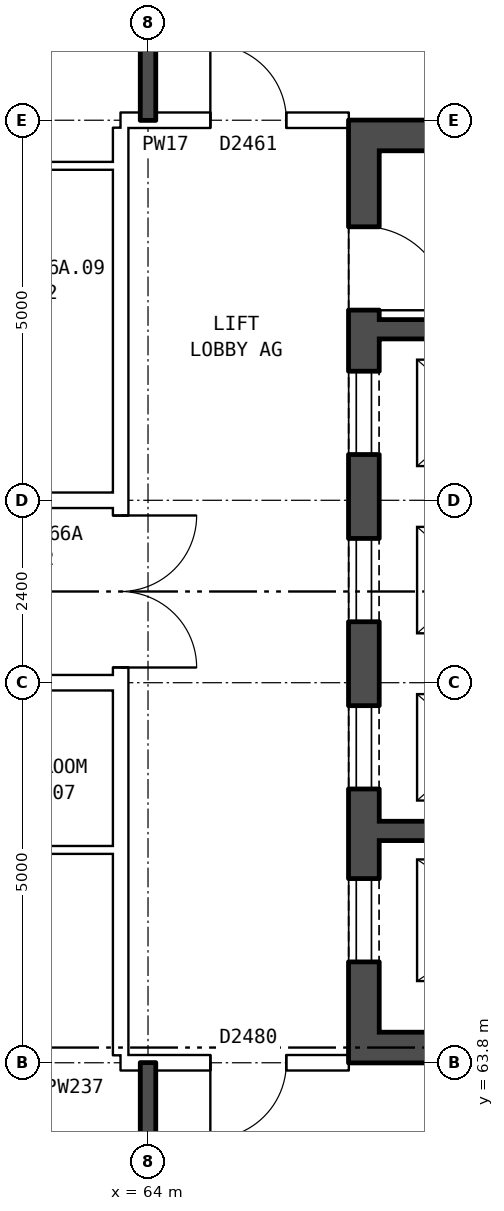
"""IFC4 building model, lengths in metres.
Left out: names, types, materials, properties, quantities, classifications, styles, units other than length and angle.
Written with IfcOpenShell. Run it as: python <this file> out.ifc"""

import sys

from ifc_helpers import new_model, si_unit, direction, frame, frame_2d, origin, place, context, subcontext, project, spatial, rectangle, extrude, element, fill, save


model = new_model("IFC4")
c1 = context("Model", 3, precision=1e-05, world=origin(), true_north=direction((0.0, 1.0)))
c2 = subcontext(c1, "Body", "Model", "MODEL_VIEW")
j1 = project(units=[si_unit("LENGTHUNIT", "METRE"), si_unit("PLANEANGLEUNIT", "RADIAN")], contexts=[c1])
p1 = place(None, origin())
s1 = spatial("IfcSite", under=j1, at=p1, CompositionType="ELEMENT")
p2 = place(p1, origin())
s2 = spatial("IfcBuilding", under=s1, at=p2, CompositionType="ELEMENT")
p3 = place(p2, frame((0.0, 0.0, 233.8)))
s3 = spatial("IfcBuildingStorey", under=s2, at=p3, CompositionType="ELEMENT", Elevation=233.8)
p4 = place(p3, frame((66.84, 63.8, 0.0), z_axis=(0.0, 0.0, 1.0), x_axis=(0.0, 1.0, 0.0)))
e1 = element("IfcWall", 1, at=p4, inside=s3, PredefinedType="SHEAR", context=c2, shape_type="SweptSolid", body=[
    extrude(rectangle(XDim=12.4, YDim=0.4, at=frame_2d((6.2, 0.0))), origin(), (0.0, 0.0, 1.0), 2.85),
])
p5 = place(p4, frame((1.325, 0.0, 0.0)))
e2 = element("IfcOpeningElement", 2, at=p5, cuts=e1, PredefinedType="OPENING", context=c2, shape_type="SweptSolid", body=[
    extrude(rectangle(XDim=1.1, YDim=2.1, at=frame_2d((0.55, 1.05))), frame((0.0, 0.21, 0.0), z_axis=(0.0, -1.0, 0.0), x_axis=(1.0, 0.0, 0.0)), (0.0, 0.0, 1.0), 0.42),
])
p6 = place(p4, frame((3.6, 0.0, 0.0)))
e3 = element("IfcOpeningElement", 3, at=p6, cuts=e1, PredefinedType="OPENING", context=c2, shape_type="SweptSolid", body=[
    extrude(rectangle(XDim=1.1, YDim=2.1, at=frame_2d((0.55, 1.05))), frame((0.0, 0.21, 0.0), z_axis=(0.0, -1.0, 0.0), x_axis=(1.0, 0.0, 0.0)), (0.0, 0.0, 1.0), 0.42),
])
p7 = place(p4, frame((5.8, 0.0, 0.0)))
e4 = element("IfcOpeningElement", 4, at=p7, cuts=e1, PredefinedType="OPENING", context=c2, shape_type="SweptSolid", body=[
    extrude(rectangle(XDim=1.1, YDim=2.1, at=frame_2d((0.55, 1.05))), frame((0.0, 0.21, 0.0), z_axis=(0.0, -1.0, 0.0), x_axis=(1.0, 0.0, 0.0)), (0.0, 0.0, 1.0), 0.42),
])
p8 = place(p4, frame((8.0, 0.0, 0.0)))
e5 = element("IfcOpeningElement", 5, at=p8, cuts=e1, PredefinedType="OPENING", context=c2, shape_type="SweptSolid", body=[
    extrude(rectangle(XDim=1.1, YDim=2.1, at=frame_2d((0.55, 1.05))), frame((0.0, 0.21, 0.0), z_axis=(0.0, -1.0, 0.0), x_axis=(1.0, 0.0, 0.0)), (0.0, 0.0, 1.0), 0.42),
])
p9 = place(p4, frame((9.9, 0.0, 0.0)))
e6 = element("IfcOpeningElement", 6, at=p9, cuts=e1, PredefinedType="OPENING", context=c2, shape_type="SweptSolid", body=[
    extrude(rectangle(XDim=1.1, YDim=2.1, at=frame_2d((0.55, 1.05))), frame((0.0, 0.21, 0.0), z_axis=(0.0, -1.0, 0.0), x_axis=(1.0, 0.0, 0.0)), (0.0, 0.0, 1.0), 0.42),
])
for number, where, z_axis, x_axis in (
    (7, (67.04, 64.0, 0.0), (0.0, 0.0, 1.0), (1.0, 0.0, 0.0)),
    (8, (67.04, 76.0, 0.0), (0.0, 0.0, 1.0), (1.0, 0.0, 0.0)),
):
    element("IfcWall", number, at=place(p3, frame(where, z_axis=z_axis, x_axis=x_axis)), inside=s3, PredefinedType="SHEAR", context=c2, shape_type="SweptSolid", body=[
        extrude(rectangle(XDim=8.2, YDim=0.4, at=frame_2d((4.1, 0.0))), origin(), (0.0, 0.0, 1.0), 2.85),
    ])
p10 = place(p3, frame((67.04, 66.85, 0.0), z_axis=(0.0, 0.0, 1.0), x_axis=(1.0, 0.0, 0.0)))
e9 = element("IfcWall", 9, at=p10, inside=s3, PredefinedType="SHEAR", context=c2, shape_type="SweptSolid", body=[
    extrude(rectangle(XDim=3.595, YDim=0.25, at=frame_2d((1.797, 0.0))), origin(), (0.0, 0.0, 1.0), 2.85),
])
p11 = place(p3, frame((67.04, 73.45, 0.0), z_axis=(0.0, 0.0, 1.0), x_axis=(1.0, 0.0, 0.0)))
e10 = element("IfcWall", 10, at=p11, inside=s3, PredefinedType="SHEAR", context=c2, shape_type="SweptSolid", body=[
    extrude(rectangle(XDim=2.525, YDim=0.25, at=frame_2d((1.262, 0.0))), origin(), (0.0, 0.0, 1.0), 2.85),
])
p12 = place(p3, frame((63.64, 63.9, 0.0), z_axis=(0.0, 0.0, 1.0), x_axis=(0.0, 1.0, 0.0)))
e11 = element("IfcWall", 11, at=p12, inside=s3, PredefinedType="PARTITIONING", context=c2, shape_type="SweptSolid", body=[
    extrude(rectangle(XDim=12.2, YDim=0.2, at=frame_2d((6.1, 0.0))), origin(), (0.0, 0.0, 1.0), 2.85),
])
p13 = place(p12, frame((5.1, 0.0, 0.0)))
e12 = element("IfcOpeningElement", 12, at=p13, cuts=e11, PredefinedType="OPENING", context=c2, shape_type="SweptSolid", body=[
    extrude(rectangle(XDim=2.0, YDim=2.1, at=frame_2d((1.0, 1.05))), frame((0.0, 0.11, 0.0), z_axis=(0.0, -1.0, 0.0), x_axis=(1.0, 0.0, 0.0)), (0.0, 0.0, 1.0), 0.22),
])
p14 = place(p3, frame((63.64, 63.8, 0.0), z_axis=(0.0, 0.0, 1.0), x_axis=(1.0, 0.0, 0.0)))
e13 = element("IfcWall", 13, at=p14, inside=s3, PredefinedType="PARTITIONING", context=c2, shape_type="SweptSolid", body=[
    extrude(rectangle(XDim=3.0, YDim=0.2, at=frame_2d((1.5, 0.0))), origin(), (0.0, 0.0, 1.0), 2.85),
])
p15 = place(p14, frame((1.18, 0.0, 0.0)))
e14 = element("IfcOpeningElement", 14, at=p15, cuts=e13, PredefinedType="OPENING", context=c2, shape_type="SweptSolid", body=[
    extrude(rectangle(XDim=1.0, YDim=2.1, at=frame_2d((0.5, 1.05))), frame((0.0, 0.11, 0.0), z_axis=(0.0, -1.0, 0.0), x_axis=(1.0, 0.0, 0.0)), (0.0, 0.0, 1.0), 0.22),
])
p16 = place(p3, frame((61.0, 66.6, 0.0), z_axis=(0.0, 0.0, 1.0), x_axis=(1.0, 0.0, 0.0)))
e15 = element("IfcWall", 15, at=p16, inside=s3, PredefinedType="PARTITIONING", context=c2, shape_type="SweptSolid", body=[
    extrude(rectangle(XDim=2.64, YDim=0.1, at=frame_2d((1.32, 0.0))), origin(), (0.0, 0.0, 1.0), 2.85),
])
p17 = place(p3, frame((44.36, 68.8, 0.0), z_axis=(0.0, 0.0, 1.0), x_axis=(1.0, 0.0, 0.0)))
e16 = element("IfcWall", 16, at=p17, inside=s3, PredefinedType="PARTITIONING", context=c2, shape_type="SweptSolid", body=[
    extrude(rectangle(XDim=19.28, YDim=0.2, at=frame_2d((9.64, 0.0))), origin(), (0.0, 0.0, 1.0), 2.85),
])
p18 = place(p17, frame((14.64, 0.0, 0.0)))
e17 = element("IfcOpeningElement", 17, at=p18, cuts=e16, PredefinedType="OPENING", context=c2, shape_type="SweptSolid", body=[
    extrude(rectangle(XDim=1.0, YDim=2.1, at=frame_2d((0.5, 1.05))), frame((0.0, 0.11, 0.0), z_axis=(0.0, -1.0, 0.0), x_axis=(1.0, 0.0, 0.0)), (0.0, 0.0, 1.0), 0.22),
])
p19 = place(p17, frame((5.64, 0.0, 0.0)))
e18 = element("IfcOpeningElement", 18, at=p19, cuts=e16, PredefinedType="OPENING", context=c2, shape_type="SweptSolid", body=[
    extrude(rectangle(XDim=1.0, YDim=2.1, at=frame_2d((0.5, 1.05))), frame((0.0, 0.11, 0.0), z_axis=(0.0, -1.0, 0.0), x_axis=(1.0, 0.0, 0.0)), (0.0, 0.0, 1.0), 0.22),
])
p20 = place(p3, frame((44.36, 71.2, 0.0), z_axis=(0.0, 0.0, 1.0), x_axis=(1.0, 0.0, 0.0)))
e19 = element("IfcWall", 19, at=p20, inside=s3, PredefinedType="PARTITIONING", context=c2, shape_type="SweptSolid", body=[
    extrude(rectangle(XDim=19.28, YDim=0.2, at=frame_2d((9.64, 0.0))), origin(), (0.0, 0.0, 1.0), 2.85),
])
p21 = place(p20, frame((14.64, 0.0, 0.0)))
e20 = element("IfcOpeningElement", 20, at=p21, cuts=e19, PredefinedType="OPENING", context=c2, shape_type="SweptSolid", body=[
    extrude(rectangle(XDim=1.0, YDim=2.1, at=frame_2d((0.5, 1.05))), frame((0.0, 0.11, 0.0), z_axis=(0.0, -1.0, 0.0), x_axis=(1.0, 0.0, 0.0)), (0.0, 0.0, 1.0), 0.22),
])
p22 = place(p20, frame((11.64, 0.0, 0.0)))
e21 = element("IfcOpeningElement", 21, at=p22, cuts=e19, PredefinedType="OPENING", context=c2, shape_type="SweptSolid", body=[
    extrude(rectangle(XDim=1.0, YDim=2.1, at=frame_2d((0.5, 1.05))), frame((0.0, 0.11, 0.0), z_axis=(0.0, -1.0, 0.0), x_axis=(1.0, 0.0, 0.0)), (0.0, 0.0, 1.0), 0.22),
])
p23 = place(p20, frame((2.64, 0.0, 0.0)))
e22 = element("IfcOpeningElement", 22, at=p23, cuts=e19, PredefinedType="OPENING", context=c2, shape_type="SweptSolid", body=[
    extrude(rectangle(XDim=1.0, YDim=2.1, at=frame_2d((0.5, 1.05))), frame((0.0, 0.11, 0.0), z_axis=(0.0, -1.0, 0.0), x_axis=(1.0, 0.0, 0.0)), (0.0, 0.0, 1.0), 0.22),
])
p24 = place(p3, frame((61.0, 75.6, 0.0), z_axis=(0.0, 0.0, 1.0), x_axis=(1.0, 0.0, 0.0)))
e23 = element("IfcWall", 23, at=p24, inside=s3, PredefinedType="PARTITIONING", context=c2, shape_type="SweptSolid", body=[
    extrude(rectangle(XDim=2.64, YDim=0.1, at=frame_2d((1.32, 0.0))), origin(), (0.0, 0.0, 1.0), 2.85),
])
p25 = place(p3, frame((63.64, 76.2, 0.0), z_axis=(0.0, 0.0, 1.0), x_axis=(1.0, 0.0, 0.0)))
e24 = element("IfcWall", 24, at=p25, inside=s3, PredefinedType="PARTITIONING", context=c2, shape_type="SweptSolid", body=[
    extrude(rectangle(XDim=3.0, YDim=0.2, at=frame_2d((1.5, 0.0))), origin(), (0.0, 0.0, 1.0), 2.85),
])
p26 = place(p25, frame((1.18, 0.0, 0.0)))
e25 = element("IfcOpeningElement", 25, at=p26, cuts=e24, PredefinedType="OPENING", context=c2, shape_type="SweptSolid", body=[
    extrude(rectangle(XDim=1.0, YDim=2.1, at=frame_2d((0.5, 1.05))), frame((0.0, 0.11, 0.0), z_axis=(0.0, -1.0, 0.0), x_axis=(1.0, 0.0, 0.0)), (0.0, 0.0, 1.0), 0.22),
])
for number, where, z_axis, x_axis in (
    (26, (64.0, 54.36, 0.0), (0.0, 0.0, 1.0), (0.0, 1.0, 0.0)),
    (27, (64.0, 76.2, 0.0), (0.0, 0.0, 1.0), (0.0, 1.0, 0.0)),
):
    element("IfcWall", number, at=place(p3, frame(where, z_axis=z_axis, x_axis=x_axis)), inside=s3, PredefinedType="SOLIDWALL", context=c2, shape_type="SweptSolid", body=[
        extrude(rectangle(XDim=9.44, YDim=0.2, at=frame_2d((4.72, 0.0))), origin(), (0.0, 0.0, 1.0), 2.85),
    ])
p27 = place(p5, origin())
e28 = element("IfcDoor", 28, at=p27, inside=s3, OperationType="DOUBLE_DOOR_SLIDING", PredefinedType="DOOR", context=c2, shape_type="SweptSolid", body=[
    extrude(rectangle(XDim=1.1, YDim=2.1, at=frame_2d((0.55, 1.05))), frame((0.0, -0.135, 0.0), z_axis=(0.0, -1.0, 0.0), x_axis=(1.0, 0.0, 0.0)), (0.0, 0.0, 1.0), 0.05),
])
fill(e2, e28)
p28 = place(p6, origin())
e29 = element("IfcDoor", 29, at=p28, inside=s3, OperationType="DOUBLE_DOOR_SLIDING", PredefinedType="DOOR", context=c2, shape_type="SweptSolid", body=[
    extrude(rectangle(XDim=1.1, YDim=2.1, at=frame_2d((0.55, 1.05))), frame((0.0, -0.135, 0.0), z_axis=(0.0, -1.0, 0.0), x_axis=(1.0, 0.0, 0.0)), (0.0, 0.0, 1.0), 0.05),
])
fill(e3, e29)
p29 = place(p7, origin())
e30 = element("IfcDoor", 30, at=p29, inside=s3, OperationType="DOUBLE_DOOR_SLIDING", PredefinedType="DOOR", context=c2, shape_type="SweptSolid", body=[
    extrude(rectangle(XDim=1.1, YDim=2.1, at=frame_2d((0.55, 1.05))), frame((0.0, -0.135, 0.0), z_axis=(0.0, -1.0, 0.0), x_axis=(1.0, 0.0, 0.0)), (0.0, 0.0, 1.0), 0.05),
])
fill(e4, e30)
p30 = place(p8, origin())
e31 = element("IfcDoor", 31, at=p30, inside=s3, OperationType="DOUBLE_DOOR_SLIDING", PredefinedType="DOOR", context=c2, shape_type="SweptSolid", body=[
    extrude(rectangle(XDim=1.1, YDim=2.1, at=frame_2d((0.55, 1.05))), frame((0.0, -0.135, 0.0), z_axis=(0.0, -1.0, 0.0), x_axis=(1.0, 0.0, 0.0)), (0.0, 0.0, 1.0), 0.05),
])
fill(e5, e31)
p31 = place(p9, frame((1.1, 0.0, 0.0), z_axis=(0.0, 0.0, 1.0), x_axis=(-1.0, 0.0, 0.0)))
e32 = element("IfcDoor", 32, at=p31, inside=s3, OperationType="SINGLE_SWING_RIGHT", PredefinedType="DOOR", context=c2, shape_type="SweptSolid", body=[
    extrude(rectangle(XDim=1.1, YDim=2.1, at=frame_2d((0.55, 1.05))), frame((0.0, 0.185, 0.0), z_axis=(0.0, -1.0, 0.0), x_axis=(1.0, 0.0, 0.0)), (0.0, 0.0, 1.0), 0.05),
])
fill(e6, e32)
p32 = place(p13, frame((2.0, 0.0, 0.0), z_axis=(0.0, 0.0, 1.0), x_axis=(-1.0, 0.0, 0.0)))
e33 = element("IfcDoor", 33, at=p32, inside=s3, OperationType="DOUBLE_DOOR_SINGLE_SWING", PredefinedType="DOOR", context=c2, shape_type="SweptSolid", body=[
    extrude(rectangle(XDim=2.0, YDim=2.1, at=frame_2d((1.0, 1.05))), frame((0.0, 0.025, 0.0), z_axis=(0.0, -1.0, 0.0), x_axis=(1.0, 0.0, 0.0)), (0.0, 0.0, 1.0), 0.05),
])
fill(e12, e33)
p33 = place(p15, frame((1.0, 0.0, 0.0), z_axis=(0.0, 0.0, 1.0), x_axis=(-1.0, 0.0, 0.0)))
e34 = element("IfcDoor", 34, at=p33, inside=s3, OperationType="SINGLE_SWING_RIGHT", PredefinedType="DOOR", context=c2, shape_type="SweptSolid", body=[
    extrude(rectangle(XDim=1.0, YDim=2.1, at=frame_2d((0.5, 1.05))), frame((0.0, 0.025, 0.0), z_axis=(0.0, -1.0, 0.0), x_axis=(1.0, 0.0, 0.0)), (0.0, 0.0, 1.0), 0.05),
])
fill(e14, e34)
p34 = place(p26, origin())
e35 = element("IfcDoor", 35, at=p34, inside=s3, OperationType="SINGLE_SWING_LEFT", PredefinedType="DOOR", context=c2, shape_type="SweptSolid", body=[
    extrude(rectangle(XDim=1.0, YDim=2.1, at=frame_2d((0.5, 1.05))), frame((0.0, 0.025, 0.0), z_axis=(0.0, -1.0, 0.0), x_axis=(1.0, 0.0, 0.0)), (0.0, 0.0, 1.0), 0.05),
])
fill(e25, e35)
save(model, sys.argv[1])
